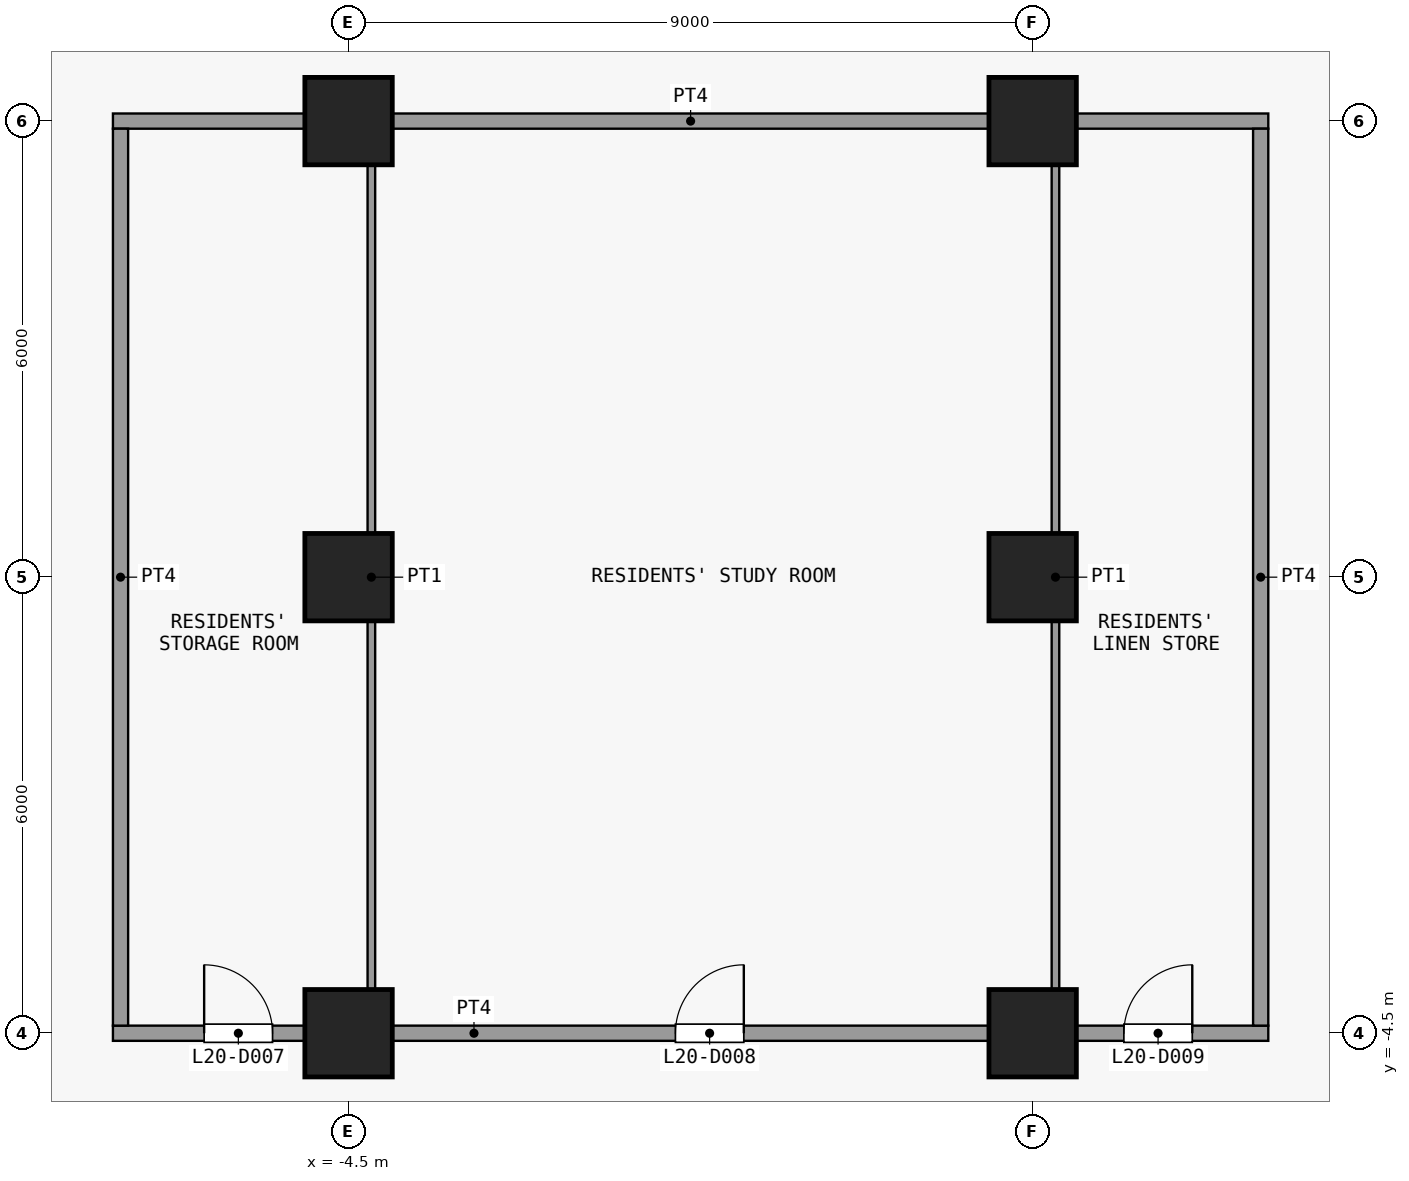
"""IFC4 building model, lengths in metres.
Left out: names, types, materials, properties, quantities, classifications, styles, units other than length and angle.
Written with IfcOpenShell. Run it as: python <this file> out.ifc"""

import sys

from ifc_helpers import new_model, si_unit, direction, frame, frame_2d, origin, origin_2d, place, context, subcontext, project, spatial, rectangle, extrude, element, fill, save


model = new_model("IFC4")
c1 = context("Model", 3, precision=1e-05, world=origin(), true_north=direction((0.0, 1.0)))
c2 = subcontext(c1, "Body", "Model", "MODEL_VIEW")
j1 = project(units=[si_unit("LENGTHUNIT", "METRE"), si_unit("PLANEANGLEUNIT", "RADIAN")], contexts=[c1])
p1 = place(None, origin())
s1 = spatial("IfcSite", under=j1, at=p1, CompositionType="ELEMENT")
p2 = place(p1, origin())
s2 = spatial("IfcBuilding", under=s1, at=p2, CompositionType="ELEMENT")
p3 = place(p2, frame((0.0, 0.0, 84.7)))
s3 = spatial("IfcBuildingStorey", under=s2, at=p3, CompositionType="ELEMENT", Elevation=84.7)
for number, where, z_axis, x_axis in (
    (1, (-4.5, -4.5, 0.0), (0.0, 0.0, 1.0), (1.0, 0.0, 0.0)),
    (2, (-4.5, 1.5, 0.0), (0.0, 0.0, 1.0), (1.0, 0.0, 0.0)),
    (3, (-4.5, 7.5, 0.0), (0.0, 0.0, 1.0), (1.0, 0.0, 0.0)),
    (4, (4.5, -4.5, 0.0), (0.0, 0.0, 1.0), (1.0, 0.0, 0.0)),
    (5, (4.5, 1.5, 0.0), (0.0, 0.0, 1.0), (1.0, 0.0, 0.0)),
    (6, (4.5, 7.5, 0.0), (0.0, 0.0, 1.0), (1.0, 0.0, 0.0)),
):
    element("IfcColumn", number, at=place(p3, frame(where, z_axis=z_axis, x_axis=x_axis)), inside=s3, PredefinedType="COLUMN", context=c2, shape_type="SweptSolid", body=[
        extrude(rectangle(XDim=1.15, YDim=1.15, at=origin_2d()), origin(), (0.0, 0.0, 1.0), 3.6),
    ])
p4 = place(p3, frame((-7.6, -4.5, 0.0), z_axis=(0.0, 0.0, 1.0), x_axis=(1.0, 0.0, 0.0)))
e7 = element("IfcWall", 7, at=p4, inside=s3, PredefinedType="PARTITIONING", context=c2, shape_type="SweptSolid", body=[
    extrude(rectangle(XDim=15.2, YDim=0.2, at=frame_2d((7.6, 0.0))), origin(), (0.0, 0.0, 1.0), 3.3),
])
p5 = place(p4, frame((1.2, 0.0, 0.0)))
e8 = element("IfcOpeningElement", 8, at=p5, cuts=e7, PredefinedType="OPENING", context=c2, shape_type="SweptSolid", body=[
    extrude(rectangle(XDim=0.9, YDim=2.1, at=frame_2d((0.45, 1.05))), frame((0.0, 0.11, 0.0), z_axis=(0.0, -1.0, 0.0), x_axis=(1.0, 0.0, 0.0)), (0.0, 0.0, 1.0), 0.22),
])
p6 = place(p4, frame((7.4, 0.0, 0.0)))
e9 = element("IfcOpeningElement", 9, at=p6, cuts=e7, PredefinedType="OPENING", context=c2, shape_type="SweptSolid", body=[
    extrude(rectangle(XDim=0.9, YDim=2.1, at=frame_2d((0.45, 1.05))), frame((0.0, 0.11, 0.0), z_axis=(0.0, -1.0, 0.0), x_axis=(1.0, 0.0, 0.0)), (0.0, 0.0, 1.0), 0.22),
])
p7 = place(p4, frame((13.3, 0.0, 0.0)))
e10 = element("IfcOpeningElement", 10, at=p7, cuts=e7, PredefinedType="OPENING", context=c2, shape_type="SweptSolid", body=[
    extrude(rectangle(XDim=0.9, YDim=2.1, at=frame_2d((0.45, 1.05))), frame((0.0, 0.11, 0.0), z_axis=(0.0, -1.0, 0.0), x_axis=(1.0, 0.0, 0.0)), (0.0, 0.0, 1.0), 0.22),
])
p8 = place(p3, frame((-7.6, 7.5, 0.0), z_axis=(0.0, 0.0, 1.0), x_axis=(1.0, 0.0, 0.0)))
e11 = element("IfcWall", 11, at=p8, inside=s3, PredefinedType="PARTITIONING", context=c2, shape_type="SweptSolid", body=[
    extrude(rectangle(XDim=15.2, YDim=0.2, at=frame_2d((7.6, 0.0))), origin(), (0.0, 0.0, 1.0), 3.3),
])
p9 = place(p3, frame((-7.5, -4.4, 0.0), z_axis=(0.0, 0.0, 1.0), x_axis=(0.0, 1.0, 0.0)))
e12 = element("IfcWall", 12, at=p9, inside=s3, PredefinedType="PARTITIONING", context=c2, shape_type="SweptSolid", body=[
    extrude(rectangle(XDim=11.8, YDim=0.2, at=frame_2d((5.9, 0.0))), origin(), (0.0, 0.0, 1.0), 3.3),
])
for number, where, z_axis, x_axis in (
    (13, (-4.2, -4.4, 0.0), (0.0, 0.0, 1.0), (0.0, 1.0, 0.0)),
    (14, (4.8, -4.4, 0.0), (0.0, 0.0, 1.0), (0.0, 1.0, 0.0)),
):
    element("IfcWall", number, at=place(p3, frame(where, z_axis=z_axis, x_axis=x_axis)), inside=s3, PredefinedType="PARTITIONING", context=c2, shape_type="SweptSolid", body=[
        extrude(rectangle(XDim=11.8, YDim=0.1, at=frame_2d((5.9, 0.0))), origin(), (0.0, 0.0, 1.0), 3.3),
    ])
p10 = place(p3, frame((7.5, -4.4, 0.0), z_axis=(0.0, 0.0, 1.0), x_axis=(0.0, 1.0, 0.0)))
e15 = element("IfcWall", 15, at=p10, inside=s3, PredefinedType="PARTITIONING", context=c2, shape_type="SweptSolid", body=[
    extrude(rectangle(XDim=11.8, YDim=0.2, at=frame_2d((5.9, 0.0))), origin(), (0.0, 0.0, 1.0), 3.3),
])
p11 = place(p5, origin())
e16 = element("IfcDoor", 16, at=p11, inside=s3, OperationType="SINGLE_SWING_RIGHT", PredefinedType="DOOR", context=c2, shape_type="SweptSolid", body=[
    extrude(rectangle(XDim=0.9, YDim=2.1, at=frame_2d((0.45, 1.05))), frame((0.0, 0.025, 0.0), z_axis=(0.0, -1.0, 0.0), x_axis=(1.0, 0.0, 0.0)), (0.0, 0.0, 1.0), 0.05),
])
fill(e8, e16)
p12 = place(p6, origin())
e17 = element("IfcDoor", 17, at=p12, inside=s3, OperationType="SINGLE_SWING_LEFT", PredefinedType="DOOR", context=c2, shape_type="SweptSolid", body=[
    extrude(rectangle(XDim=0.9, YDim=2.1, at=frame_2d((0.45, 1.05))), frame((0.0, 0.025, 0.0), z_axis=(0.0, -1.0, 0.0), x_axis=(1.0, 0.0, 0.0)), (0.0, 0.0, 1.0), 0.05),
])
fill(e9, e17)
p13 = place(p7, origin())
e18 = element("IfcDoor", 18, at=p13, inside=s3, OperationType="SINGLE_SWING_LEFT", PredefinedType="DOOR", context=c2, shape_type="SweptSolid", body=[
    extrude(rectangle(XDim=0.9, YDim=2.1, at=frame_2d((0.45, 1.05))), frame((0.0, 0.025, 0.0), z_axis=(0.0, -1.0, 0.0), x_axis=(1.0, 0.0, 0.0)), (0.0, 0.0, 1.0), 0.05),
])
fill(e10, e18)
save(model, sys.argv[1])
